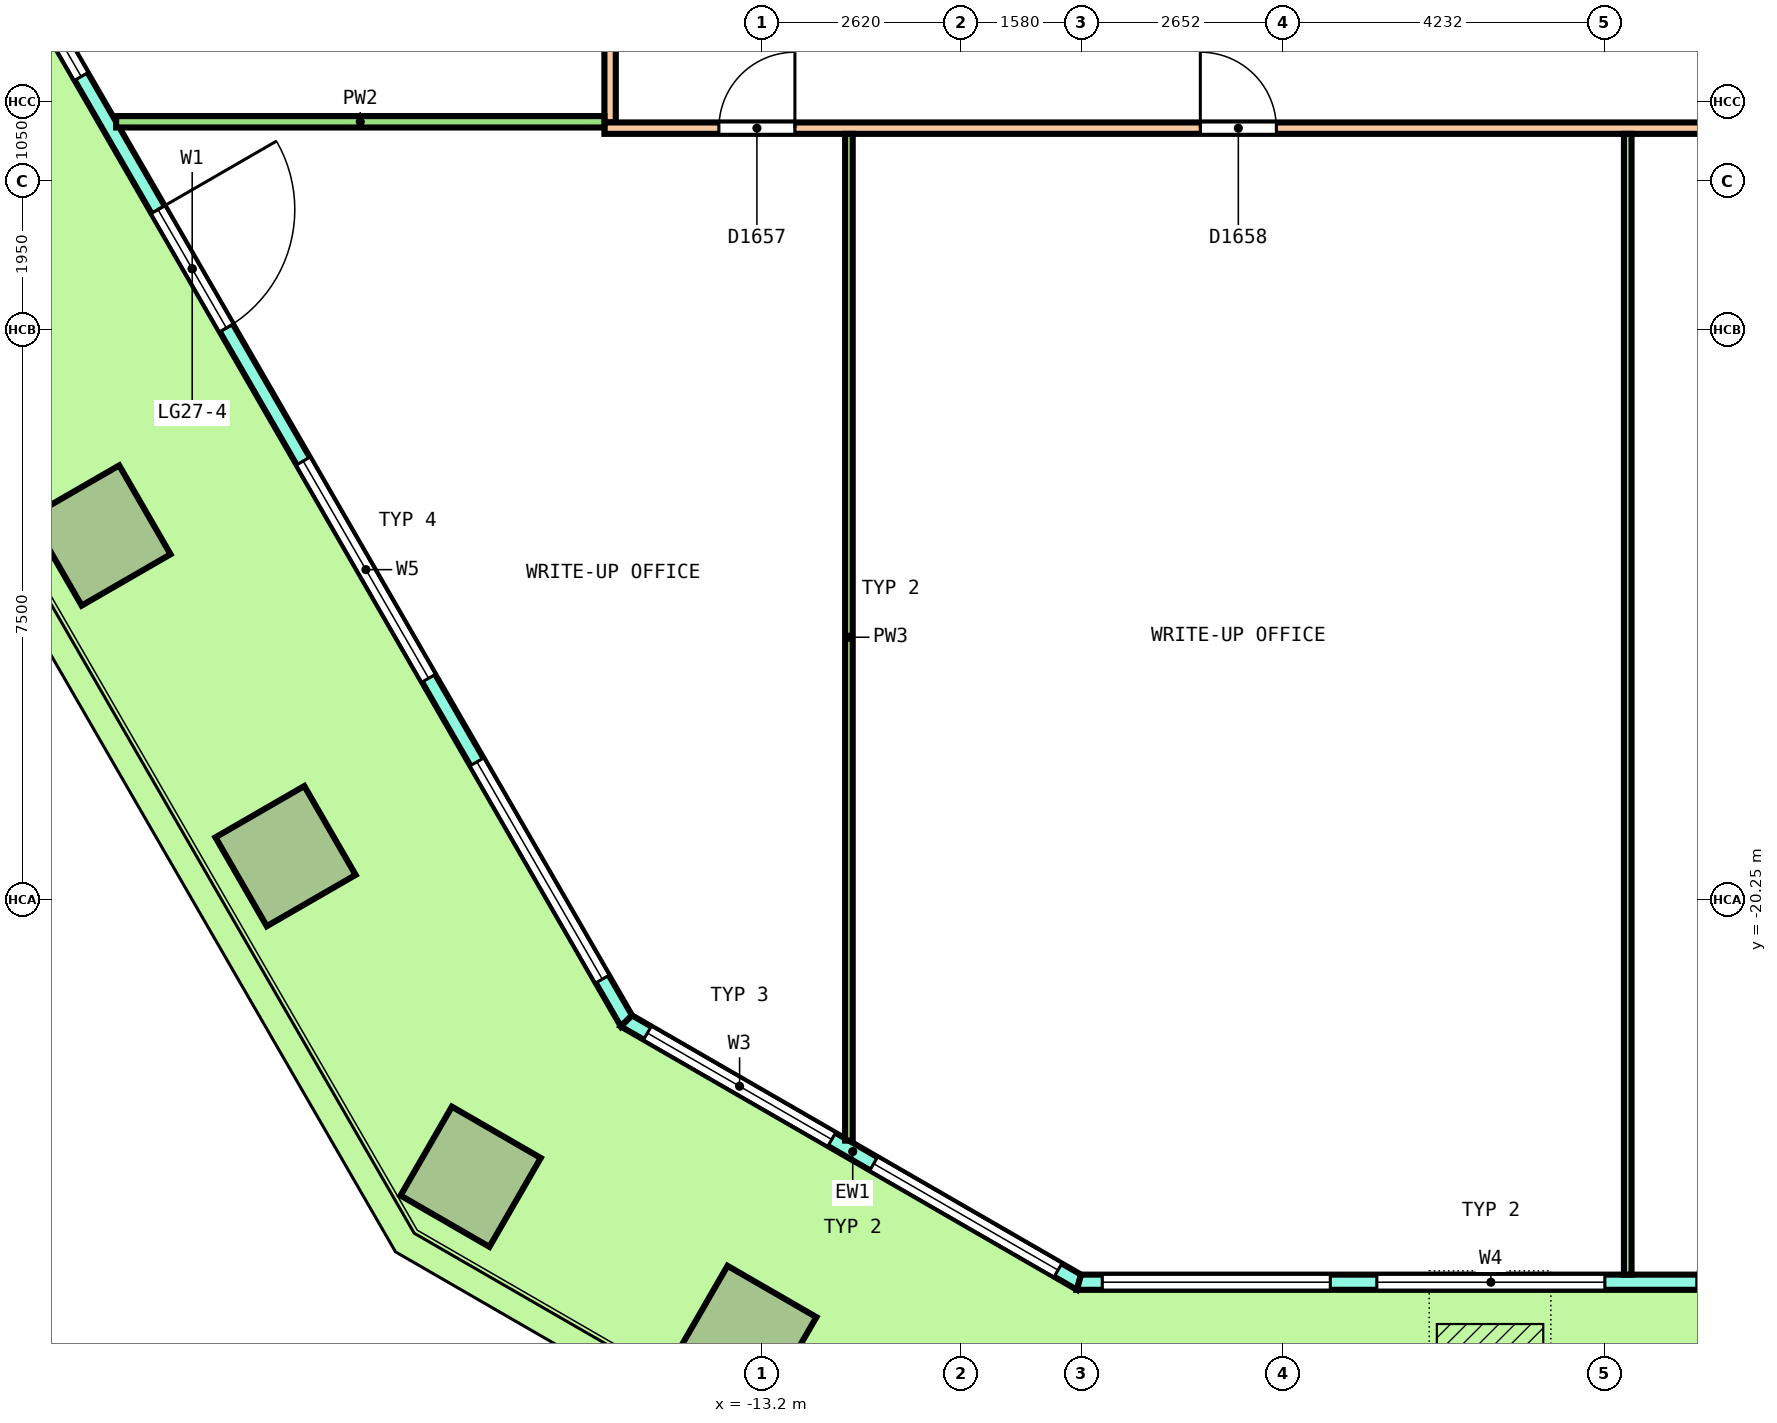
"""IFC4 building model, lengths in metres.
Left out: names, types, materials, properties, quantities, classifications, styles, units other than length and angle.
Written with IfcOpenShell. Run it as: python <this file> out.ifc"""

import sys

from ifc_helpers import new_model, si_unit, direction, frame, frame_2d, origin, origin_2d, place, context, subcontext, project, spatial, polyline, rectangle, outline, extrude, element, fill, save


model = new_model("IFC4")
c1 = context("Model", 3, precision=1e-05, world=origin(), true_north=direction((0.0, 1.0)))
c2 = subcontext(c1, "Body", "Model", "MODEL_VIEW")
j1 = project(units=[si_unit("LENGTHUNIT", "METRE"), si_unit("PLANEANGLEUNIT", "RADIAN")], contexts=[c1])
p1 = place(None, origin())
s1 = spatial("IfcSite", under=j1, at=p1, CompositionType="ELEMENT")
p2 = place(p1, origin())
s2 = spatial("IfcBuilding", under=s1, at=p2, CompositionType="ELEMENT")
p3 = place(p2, frame((0.0, 0.0, 126.4)))
s3 = spatial("IfcBuildingStorey", under=s2, at=p3, CompositionType="ELEMENT", Elevation=126.4)
for number, where, z_axis, x_axis in (
    (1, (-21.905, -15.459, 0.0), (0.0, 0.0, 1.0), (0.5, -0.866, 0.0)),
    (2, (-19.47, -19.677, 0.0), (0.0, 0.0, 1.0), (0.5, -0.866, 0.0)),
    (3, (-17.035, -23.895, 0.0), (0.0, 0.0, 1.0), (0.866, -0.5, 0.0)),
    (4, (-13.408, -25.989, 0.0), (0.0, 0.0, 1.0), (0.866, -0.5, 0.0)),
):
    element("IfcColumn", number, at=place(p3, frame(where, z_axis=z_axis, x_axis=x_axis)), inside=s3, PredefinedType="COLUMN", context=c2, shape_type="SweptSolid", body=[
        extrude(rectangle(XDim=1.35, YDim=1.35, at=origin_2d()), origin(), (0.0, 0.0, 1.0), 4.05),
    ])
p4 = place(p3, frame((-26.411, -2.055, 0.0), z_axis=(0.0, 0.0, 1.0), x_axis=(0.50000204422, -0.86602422355, 0.0)))
e5 = element("IfcWall", 5, at=p4, inside=s3, PredefinedType="SOLIDWALL", context=c2, shape_type="SweptSolid", body=[
    extrude(outline(polyline([(-0.027, -0.1), (1.014, -0.1), (2.055, -0.1), (3.097, -0.1), (4.138, -0.1), (5.179, -0.1), (6.22, -0.1), (7.261, -0.1), (8.303, -0.1), (9.344, -0.1), (10.385, -0.1), (11.426, -0.1), (12.468, -0.1), (13.509, -0.1), (14.55, -0.1), (15.591, -0.1), (16.632, -0.1), (17.673, -0.1), (18.715, -0.1), (19.756, -0.1), (20.797, -0.1), (21.838, -0.1), (22.879, -0.1), (22.826, 0.1), (21.789, 0.1), (20.753, 0.1), (19.717, 0.1), (18.68, 0.1), (17.644, 0.1), (16.608, 0.1), (15.572, 0.1), (14.535, 0.1), (13.499, 0.1), (12.463, 0.1), (11.426, 0.1), (10.39, 0.1), (9.354, 0.1), (8.317, 0.1), (7.281, 0.1), (6.245, 0.1), (5.208, 0.1), (4.172, 0.1), (3.136, 0.1), (2.099, 0.1), (1.063, 0.1), (0.027, 0.1), (-0.027, -0.1)])), origin(), (0.0, 0.0, 1.0), 4.1),
])
p5 = place(p4, frame((0.635, 0.0, 0.1)))
e6 = element("IfcOpeningElement", 6, at=p5, cuts=e5, PredefinedType="OPENING", context=c2, shape_type="SweptSolid", body=[
    extrude(rectangle(XDim=3.3, YDim=2.9, at=frame_2d((1.65, 1.45))), frame((0.0, 0.11, 0.0), z_axis=(0.0, -1.0, 0.0), x_axis=(1.0, 0.0, 0.0)), (0.0, 0.0, 1.0), 0.22),
])
p6 = place(p4, frame((5.206, 0.0, 0.1)))
e7 = element("IfcOpeningElement", 7, at=p6, cuts=e5, PredefinedType="OPENING", context=c2, shape_type="SweptSolid", body=[
    extrude(rectangle(XDim=3.3, YDim=2.9, at=frame_2d((1.65, 1.45))), frame((0.0, 0.11, 0.0), z_axis=(0.0, -1.0, 0.0), x_axis=(1.0, 0.0, 0.0)), (0.0, 0.0, 1.0), 0.22),
])
p7 = place(p4, frame((10.526, 0.0, 0.0)))
e8 = element("IfcOpeningElement", 8, at=p7, cuts=e5, PredefinedType="OPENING", context=c2, shape_type="SweptSolid", body=[
    extrude(rectangle(XDim=1.8, YDim=2.4, at=frame_2d((0.9, 1.2))), frame((0.0, 0.11, 0.0), z_axis=(0.0, -1.0, 0.0), x_axis=(1.0, 0.0, 0.0)), (0.0, 0.0, 1.0), 0.22),
])
p8 = place(p4, frame((10.526, 0.0, 2.55)))
e9 = element("IfcOpeningElement", 9, at=p8, cuts=e5, PredefinedType="OPENING", context=c2, shape_type="SweptSolid", body=[
    extrude(rectangle(XDim=1.8, YDim=0.45, at=frame_2d((0.9, 0.225))), frame((0.0, 0.11, 0.0), z_axis=(0.0, -1.0, 0.0), x_axis=(1.0, 0.0, 0.0)), (0.0, 0.0, 1.0), 0.22),
])
p9 = place(p4, frame((14.347, 0.0, 0.1)))
e10 = element("IfcOpeningElement", 10, at=p9, cuts=e5, PredefinedType="OPENING", context=c2, shape_type="SweptSolid", body=[
    extrude(rectangle(XDim=3.3, YDim=2.9, at=frame_2d((1.65, 1.45))), frame((0.0, 0.11, 0.0), z_axis=(0.0, -1.0, 0.0), x_axis=(1.0, 0.0, 0.0)), (0.0, 0.0, 1.0), 0.22),
])
p10 = place(p4, frame((18.917, 0.0, 0.1)))
e11 = element("IfcOpeningElement", 11, at=p10, cuts=e5, PredefinedType="OPENING", context=c2, shape_type="SweptSolid", body=[
    extrude(rectangle(XDim=3.3, YDim=2.9, at=frame_2d((1.65, 1.45))), frame((0.0, 0.11, 0.0), z_axis=(0.0, -1.0, 0.0), x_axis=(1.0, 0.0, 0.0)), (0.0, 0.0, 1.0), 0.22),
])
p11 = place(p3, frame((-14.985, -21.845, 0.0), z_axis=(0.0, 0.0, 1.0), x_axis=(0.866029458321, -0.49999297727, 0.0)))
e12 = element("IfcWall", 12, at=p11, inside=s3, PredefinedType="SOLIDWALL", context=c2, shape_type="SweptSolid", body=[
    extrude(outline(polyline([(-0.027, -0.1), (1.128, -0.1), (2.282, -0.1), (3.437, -0.1), (4.592, -0.1), (5.747, -0.1), (6.901, -0.1), (6.848, 0.1), (5.711, 0.1), (4.574, 0.1), (3.437, 0.1), (2.301, 0.1), (1.164, 0.1), (0.027, 0.1), (-0.027, -0.1)])), origin(), (0.0, 0.0, 1.0), 4.1),
])
p12 = place(p11, frame((0.319, 0.0, 0.1)))
e13 = element("IfcOpeningElement", 13, at=p12, cuts=e12, PredefinedType="OPENING", context=c2, shape_type="SweptSolid", body=[
    extrude(rectangle(XDim=2.8, YDim=2.9, at=frame_2d((1.4, 1.45))), frame((0.0, 0.11, 0.0), z_axis=(0.0, -1.0, 0.0), x_axis=(1.0, 0.0, 0.0)), (0.0, 0.0, 1.0), 0.22),
])
p13 = place(p11, frame((3.756, 0.0, 0.1)))
e14 = element("IfcOpeningElement", 14, at=p13, cuts=e12, PredefinedType="OPENING", context=c2, shape_type="SweptSolid", body=[
    extrude(rectangle(XDim=2.8, YDim=2.9, at=frame_2d((1.4, 1.45))), frame((0.0, 0.11, 0.0), z_axis=(0.0, -1.0, 0.0), x_axis=(1.0, 0.0, 0.0)), (0.0, 0.0, 1.0), 0.22),
])
p14 = place(p3, frame((-9.031, -25.283, 0.0), z_axis=(0.0, 0.0, 1.0), x_axis=(1.0, 0.0, 0.0)))
e15 = element("IfcWall", 15, at=p14, inside=s3, PredefinedType="SOLIDWALL", context=c2, shape_type="SweptSolid", body=[
    extrude(outline(polyline([(-0.027, -0.1), (0.979, -0.1), (1.986, -0.1), (2.992, -0.1), (3.999, -0.1), (5.005, -0.1), (6.012, -0.1), (7.018, -0.1), (8.025, -0.1), (9.031, -0.1), (10.038, -0.1), (11.044, -0.1), (12.051, -0.1), (13.057, -0.1), (14.063, -0.1), (15.07, -0.1), (16.076, -0.1), (17.083, -0.1), (18.089, -0.1), (18.036, 0.1), (17.035, 0.1), (16.035, 0.1), (15.034, 0.1), (14.034, 0.1), (13.033, 0.1), (12.033, 0.1), (11.032, 0.1), (10.032, 0.1), (9.031, 0.1), (8.031, 0.1), (7.03, 0.1), (6.03, 0.1), (5.029, 0.1), (4.029, 0.1), (3.028, 0.1), (2.028, 0.1), (1.027, 0.1), (0.027, 0.1), (-0.027, -0.1)])), origin(), (0.0, 0.0, 1.0), 4.1),
])
p15 = place(p14, frame((0.306, 0.0, 0.1)))
e16 = element("IfcOpeningElement", 16, at=p15, cuts=e15, PredefinedType="OPENING", context=c2, shape_type="SweptSolid", body=[
    extrude(rectangle(XDim=3.0, YDim=2.9, at=frame_2d((1.5, 1.45))), frame((0.0, 0.11, 0.0), z_axis=(0.0, -1.0, 0.0), x_axis=(1.0, 0.0, 0.0)), (0.0, 0.0, 1.0), 0.22),
])
p16 = place(p14, frame((3.919, 0.0, 0.1)))
e17 = element("IfcOpeningElement", 17, at=p16, cuts=e15, PredefinedType="OPENING", context=c2, shape_type="SweptSolid", body=[
    extrude(rectangle(XDim=3.0, YDim=2.9, at=frame_2d((1.5, 1.45))), frame((0.0, 0.11, 0.0), z_axis=(0.0, -1.0, 0.0), x_axis=(1.0, 0.0, 0.0)), (0.0, 0.0, 1.0), 0.22),
])
p17 = place(p14, frame((8.131, 0.0, 0.0)))
e18 = element("IfcOpeningElement", 18, at=p17, cuts=e15, PredefinedType="OPENING", context=c2, shape_type="SweptSolid", body=[
    extrude(rectangle(XDim=1.8, YDim=2.4, at=frame_2d((0.9, 1.2))), frame((0.0, 0.11, 0.0), z_axis=(0.0, -1.0, 0.0), x_axis=(1.0, 0.0, 0.0)), (0.0, 0.0, 1.0), 0.22),
])
p18 = place(p14, frame((8.131, 0.0, 2.55)))
e19 = element("IfcOpeningElement", 19, at=p18, cuts=e15, PredefinedType="OPENING", context=c2, shape_type="SweptSolid", body=[
    extrude(rectangle(XDim=1.8, YDim=0.45, at=frame_2d((0.9, 0.225))), frame((0.0, 0.11, 0.0), z_axis=(0.0, -1.0, 0.0), x_axis=(1.0, 0.0, 0.0)), (0.0, 0.0, 1.0), 0.22),
])
p19 = place(p14, frame((11.144, 0.0, 0.1)))
e20 = element("IfcOpeningElement", 20, at=p19, cuts=e15, PredefinedType="OPENING", context=c2, shape_type="SweptSolid", body=[
    extrude(rectangle(XDim=3.0, YDim=2.9, at=frame_2d((1.5, 1.45))), frame((0.0, 0.11, 0.0), z_axis=(0.0, -1.0, 0.0), x_axis=(1.0, 0.0, 0.0)), (0.0, 0.0, 1.0), 0.22),
])
p20 = place(p14, frame((14.756, 0.0, 0.1)))
e21 = element("IfcOpeningElement", 21, at=p20, cuts=e15, PredefinedType="OPENING", context=c2, shape_type="SweptSolid", body=[
    extrude(rectangle(XDim=3.0, YDim=2.9, at=frame_2d((1.5, 1.45))), frame((0.0, 0.11, 0.0), z_axis=(0.0, -1.0, 0.0), x_axis=(1.0, 0.0, 0.0)), (0.0, 0.0, 1.0), 0.22),
])
p21 = place(p3, frame((-15.2, -10.025, 0.0), z_axis=(0.0, 0.0, 1.0), x_axis=(0.0, 1.0, 0.0)))
e22 = element("IfcWall", 22, at=p21, inside=s3, PredefinedType="PARTITIONING", context=c2, shape_type="SweptSolid", body=[
    extrude(rectangle(XDim=8.901, YDim=0.15, at=frame_2d((4.45, 0.0))), origin(), (0.0, 0.0, 1.0), 3.05),
])
p22 = place(p3, frame((-15.275, -10.1, 0.0), z_axis=(0.0, 0.0, 1.0), x_axis=(1.0, 0.0, 0.0)))
e23 = element("IfcWall", 23, at=p22, inside=s3, PredefinedType="PARTITIONING", context=c2, shape_type="SweptSolid", body=[
    extrude(rectangle(XDim=30.4, YDim=0.15, at=frame_2d((15.2, 0.0))), origin(), (0.0, 0.0, 1.0), 3.05),
])
p23 = place(p22, frame((1.506, 0.0, 0.0)))
e24 = element("IfcOpeningElement", 24, at=p23, cuts=e23, PredefinedType="OPENING", context=c2, shape_type="SweptSolid", body=[
    extrude(rectangle(XDim=1.0, YDim=2.1, at=frame_2d((0.5, 1.05))), frame((0.0, 0.085, 0.0), z_axis=(0.0, -1.0, 0.0), x_axis=(1.0, 0.0, 0.0)), (0.0, 0.0, 1.0), 0.17),
])
p24 = place(p22, frame((7.84, 0.0, 0.0)))
e25 = element("IfcOpeningElement", 25, at=p24, cuts=e23, PredefinedType="OPENING", context=c2, shape_type="SweptSolid", body=[
    extrude(rectangle(XDim=1.0, YDim=2.1, at=frame_2d((0.5, 1.05))), frame((0.0, 0.085, 0.0), z_axis=(0.0, -1.0, 0.0), x_axis=(1.0, 0.0, 0.0)), (0.0, 0.0, 1.0), 0.17),
])
p25 = place(p22, frame((15.685, 0.0, 0.0)))
e26 = element("IfcOpeningElement", 26, at=p25, cuts=e23, PredefinedType="OPENING", context=c2, shape_type="SweptSolid", body=[
    extrude(rectangle(XDim=1.2, YDim=2.1, at=frame_2d((0.6, 1.05))), frame((0.0, 0.085, 0.0), z_axis=(0.0, -1.0, 0.0), x_axis=(1.0, 0.0, 0.0)), (0.0, 0.0, 1.0), 0.17),
])
p26 = place(p22, frame((23.812, 0.0, 0.0)))
e27 = element("IfcOpeningElement", 27, at=p26, cuts=e23, PredefinedType="OPENING", context=c2, shape_type="SweptSolid", body=[
    extrude(rectangle(XDim=1.2, YDim=2.1, at=frame_2d((0.6, 1.05))), frame((0.0, 0.085, 0.0), z_axis=(0.0, -1.0, 0.0), x_axis=(1.0, 0.0, 0.0)), (0.0, 0.0, 1.0), 0.17),
])
p27 = place(p3, frame((-21.699, -10.016, 0.0), z_axis=(0.0, 0.0, 1.0), x_axis=(1.0, 0.0, 0.0)))
e28 = element("IfcWall", 28, at=p27, inside=s3, PredefinedType="PARTITIONING", context=c2, shape_type="SweptSolid", body=[
    extrude(rectangle(XDim=6.424, YDim=0.15, at=frame_2d((3.212, 0.0))), origin(), (0.0, 0.0, 1.0), 3.05),
])
p28 = place(p3, frame((-12.058, -23.42, 0.0), z_axis=(0.0, 0.0, 1.0), x_axis=(0.0, 1.0, 0.0)))
e29 = element("IfcWall", 29, at=p28, inside=s3, PredefinedType="PARTITIONING", context=c2, shape_type="SweptSolid", body=[
    extrude(rectangle(XDim=13.245, YDim=0.1, at=frame_2d((6.623, 0.0))), origin(), (0.0, 0.0, 1.0), 3.05),
])
p29 = place(p3, frame((-1.812, -25.183, 0.0), z_axis=(0.0, 0.0, 1.0), x_axis=(0.0, 1.0, 0.0)))
e30 = element("IfcWall", 30, at=p29, inside=s3, PredefinedType="PARTITIONING", context=c2, shape_type="SweptSolid", body=[
    extrude(rectangle(XDim=15.008, YDim=0.1, at=frame_2d((7.504, 0.0))), origin(), (0.0, 0.0, 1.0), 3.05),
])
p30 = place(p6, origin())
e31 = element("IfcWindow", 31, at=p30, inside=s3, PartitioningType="SINGLE_PANEL", PredefinedType="WINDOW", context=c2, shape_type="SweptSolid", body=[
    extrude(rectangle(XDim=3.3, YDim=2.9, at=frame_2d((1.65, 1.45))), frame((0.0, 0.03, 0.0), z_axis=(0.0, -1.0, 0.0), x_axis=(1.0, 0.0, 0.0)), (0.0, 0.0, 1.0), 0.06),
])
fill(e7, e31)
p31 = place(p7, origin())
e32 = element("IfcDoor", 32, at=p31, inside=s3, OperationType="DOUBLE_DOOR_SINGLE_SWING", PredefinedType="DOOR", context=c2, shape_type="SweptSolid", body=[
    extrude(rectangle(XDim=1.8, YDim=2.4, at=frame_2d((0.9, 1.2))), frame((0.0, 0.025, 0.0), z_axis=(0.0, -1.0, 0.0), x_axis=(1.0, 0.0, 0.0)), (0.0, 0.0, 1.0), 0.05),
])
fill(e8, e32)
p32 = place(p8, origin())
e33 = element("IfcWindow", 33, at=p32, inside=s3, PartitioningType="SINGLE_PANEL", PredefinedType="WINDOW", context=c2, shape_type="SweptSolid", body=[
    extrude(rectangle(XDim=1.8, YDim=0.45, at=frame_2d((0.9, 0.225))), frame((0.0, 0.03, 0.0), z_axis=(0.0, -1.0, 0.0), x_axis=(1.0, 0.0, 0.0)), (0.0, 0.0, 1.0), 0.06),
])
fill(e9, e33)
p33 = place(p9, origin())
e34 = element("IfcWindow", 34, at=p33, inside=s3, PartitioningType="SINGLE_PANEL", PredefinedType="WINDOW", context=c2, shape_type="SweptSolid", body=[
    extrude(rectangle(XDim=3.3, YDim=2.9, at=frame_2d((1.65, 1.45))), frame((0.0, 0.03, 0.0), z_axis=(0.0, -1.0, 0.0), x_axis=(1.0, 0.0, 0.0)), (0.0, 0.0, 1.0), 0.06),
])
fill(e10, e34)
p34 = place(p10, origin())
e35 = element("IfcWindow", 35, at=p34, inside=s3, PartitioningType="SINGLE_PANEL", PredefinedType="WINDOW", context=c2, shape_type="SweptSolid", body=[
    extrude(rectangle(XDim=3.3, YDim=2.9, at=frame_2d((1.65, 1.45))), frame((0.0, 0.03, 0.0), z_axis=(0.0, -1.0, 0.0), x_axis=(1.0, 0.0, 0.0)), (0.0, 0.0, 1.0), 0.06),
])
fill(e11, e35)
p35 = place(p12, origin())
e36 = element("IfcWindow", 36, at=p35, inside=s3, PartitioningType="SINGLE_PANEL", PredefinedType="WINDOW", context=c2, shape_type="SweptSolid", body=[
    extrude(rectangle(XDim=2.8, YDim=2.9, at=frame_2d((1.4, 1.45))), frame((0.0, 0.03, 0.0), z_axis=(0.0, -1.0, 0.0), x_axis=(1.0, 0.0, 0.0)), (0.0, 0.0, 1.0), 0.06),
])
fill(e13, e36)
p36 = place(p13, origin())
e37 = element("IfcWindow", 37, at=p36, inside=s3, PartitioningType="SINGLE_PANEL", PredefinedType="WINDOW", context=c2, shape_type="SweptSolid", body=[
    extrude(rectangle(XDim=2.8, YDim=2.9, at=frame_2d((1.4, 1.45))), frame((0.0, 0.03, 0.0), z_axis=(0.0, -1.0, 0.0), x_axis=(1.0, 0.0, 0.0)), (0.0, 0.0, 1.0), 0.06),
])
fill(e14, e37)
p37 = place(p15, origin())
e38 = element("IfcWindow", 38, at=p37, inside=s3, PartitioningType="SINGLE_PANEL", PredefinedType="WINDOW", context=c2, shape_type="SweptSolid", body=[
    extrude(rectangle(XDim=3.0, YDim=2.9, at=frame_2d((1.5, 1.45))), frame((0.0, 0.03, 0.0), z_axis=(0.0, -1.0, 0.0), x_axis=(1.0, 0.0, 0.0)), (0.0, 0.0, 1.0), 0.06),
])
fill(e16, e38)
p38 = place(p16, origin())
e39 = element("IfcWindow", 39, at=p38, inside=s3, PartitioningType="SINGLE_PANEL", PredefinedType="WINDOW", context=c2, shape_type="SweptSolid", body=[
    extrude(rectangle(XDim=3.0, YDim=2.9, at=frame_2d((1.5, 1.45))), frame((0.0, 0.03, 0.0), z_axis=(0.0, -1.0, 0.0), x_axis=(1.0, 0.0, 0.0)), (0.0, 0.0, 1.0), 0.06),
])
fill(e17, e39)
p39 = place(p23, origin())
e40 = element("IfcDoor", 40, at=p39, inside=s3, OperationType="SINGLE_SWING_RIGHT", PredefinedType="DOOR", context=c2, shape_type="SweptSolid", body=[
    extrude(rectangle(XDim=1.0, YDim=2.1, at=frame_2d((0.5, 1.05))), frame((0.0, 0.025, 0.0), z_axis=(0.0, -1.0, 0.0), x_axis=(1.0, 0.0, 0.0)), (0.0, 0.0, 1.0), 0.05),
])
fill(e24, e40)
p40 = place(p24, origin())
e41 = element("IfcDoor", 41, at=p40, inside=s3, OperationType="SINGLE_SWING_LEFT", PredefinedType="DOOR", context=c2, shape_type="SweptSolid", body=[
    extrude(rectangle(XDim=1.0, YDim=2.1, at=frame_2d((0.5, 1.05))), frame((0.0, 0.025, 0.0), z_axis=(0.0, -1.0, 0.0), x_axis=(1.0, 0.0, 0.0)), (0.0, 0.0, 1.0), 0.05),
])
fill(e25, e41)
save(model, sys.argv[1])
